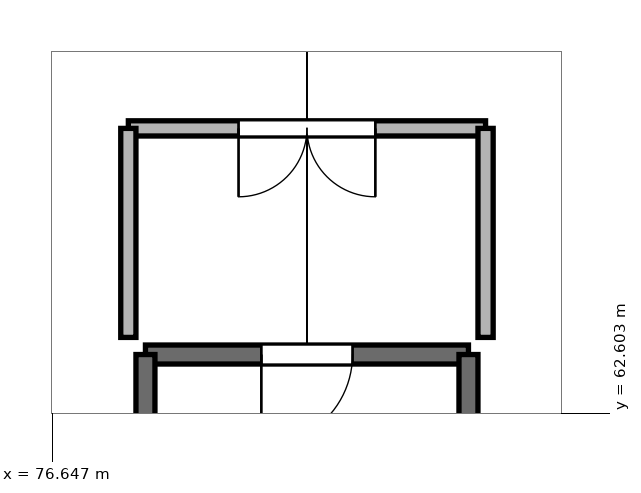
"""IFC4 building model, lengths in metres.
Left out: names, types, materials, properties, quantities, classifications, styles, units other than length and angle.
Written with IfcOpenShell. Run it as: python <this file> out.ifc"""

import sys

from ifc_helpers import new_model, si_unit, direction, frame, frame_2d, origin, place, context, subcontext, project, spatial, rectangle, extrude, element, fill, save


model = new_model("IFC4")
c1 = context("Model", 3, precision=1e-05, world=origin(), true_north=direction((0.0, 1.0)))
c2 = subcontext(c1, "Body", "Model", "MODEL_VIEW")
j1 = project(units=[si_unit("LENGTHUNIT", "METRE"), si_unit("PLANEANGLEUNIT", "RADIAN")], contexts=[c1])
p1 = place(None, origin())
s1 = spatial("IfcSite", under=j1, at=p1, CompositionType="ELEMENT")
p2 = place(p1, origin())
s2 = spatial("IfcBuilding", under=s1, at=p2, CompositionType="ELEMENT")
p3 = place(p2, frame((0.0, 0.0, 30.8)))
s3 = spatial("IfcBuildingStorey", under=s2, at=p3, CompositionType="ELEMENT", Elevation=30.8)
p4 = place(p3, frame((82.125, 63.375, 0.0), z_axis=(0.0, 0.0, 1.0), x_axis=(-1.0, 0.0, 0.0)))
e1 = element("IfcWall", 1, at=p4, inside=s3, PredefinedType="SHEAR", context=c2, shape_type="SweptSolid", body=[
    extrude(rectangle(XDim=4.25, YDim=0.25, at=frame_2d((2.125, 0.0))), origin(), (0.0, 0.0, 1.0), 3.0),
])
p5 = place(p4, frame((1.525, 0.0, 0.0)))
e2 = element("IfcOpeningElement", 2, at=p5, cuts=e1, PredefinedType="OPENING", context=c2, shape_type="SweptSolid", body=[
    extrude(rectangle(XDim=1.2, YDim=2.2, at=frame_2d((0.6, 1.1))), frame((0.0, 0.137, 0.0), z_axis=(0.0, -1.0, 0.0), x_axis=(1.0, 0.0, 0.0)), (0.0, 0.0, 1.0), 0.274),
])
for number, where, z_axis, x_axis in (
    (3, (77.875, 63.375, 0.0), (0.0, 0.0, 1.0), (0.0, -1.0, 0.0)),
    (4, (82.125, 56.175, 0.0), (0.0, 0.0, 1.0), (0.0, 1.0, 0.0)),
):
    element("IfcWall", number, at=place(p3, frame(where, z_axis=z_axis, x_axis=x_axis)), inside=s3, PredefinedType="SHEAR", context=c2, shape_type="SweptSolid", body=[
        extrude(rectangle(XDim=7.2, YDim=0.25, at=frame_2d((3.6, 0.0))), origin(), (0.0, 0.0, 1.0), 3.0),
    ])
p6 = place(p3, frame((77.65, 66.35, 0.0), z_axis=(0.0, 0.0, 1.0), x_axis=(1.0, 0.0, 0.0)))
e5 = element("IfcWall", 5, at=p6, inside=s3, PredefinedType="PARTITIONING", context=c2, shape_type="SweptSolid", body=[
    extrude(rectangle(XDim=4.7, YDim=0.2, at=frame_2d((2.35, 0.0))), origin(), (0.0, 0.0, 1.0), 2.53),
])
p7 = place(p6, frame((1.45, 0.0, 0.0)))
e6 = element("IfcOpeningElement", 6, at=p7, cuts=e5, PredefinedType="OPENING", context=c2, shape_type="SweptSolid", body=[
    extrude(rectangle(XDim=1.8, YDim=2.2, at=frame_2d((0.9, 1.1))), frame((0.0, 0.112, 0.0), z_axis=(0.0, -1.0, 0.0), x_axis=(1.0, 0.0, 0.0)), (0.0, 0.0, 1.0), 0.224),
])
for number, where, z_axis, x_axis in (
    (7, (77.65, 63.6, 0.0), (0.0, 0.0, 1.0), (0.0, 1.0, 0.0)),
    (8, (82.35, 63.6, 0.0), (0.0, 0.0, 1.0), (0.0, 1.0, 0.0)),
):
    element("IfcWall", number, at=place(p3, frame(where, z_axis=z_axis, x_axis=x_axis)), inside=s3, PredefinedType="PARTITIONING", context=c2, shape_type="SweptSolid", body=[
        extrude(rectangle(XDim=2.75, YDim=0.2, at=frame_2d((1.375, 0.0))), origin(), (0.0, 0.0, 1.0), 2.53),
    ])
p8 = place(p5, origin())
e9 = element("IfcDoor", 9, at=p8, inside=s3, OperationType="SINGLE_SWING_RIGHT", PredefinedType="DOOR", context=c2, shape_type="SweptSolid", body=[
    extrude(rectangle(XDim=1.2, YDim=2.2, at=frame_2d((0.6, 1.1))), frame((0.0, 0.025, 0.0), z_axis=(0.0, -1.0, 0.0), x_axis=(1.0, 0.0, 0.0)), (0.0, 0.0, 1.0), 0.05),
])
fill(e2, e9)
p9 = place(p7, frame((1.8, 0.0, 0.0), z_axis=(0.0, 0.0, 1.0), x_axis=(-1.0, 0.0, 0.0)))
e10 = element("IfcDoor", 10, at=p9, inside=s3, OperationType="DOUBLE_DOOR_SINGLE_SWING", PredefinedType="DOOR", context=c2, shape_type="SweptSolid", body=[
    extrude(rectangle(XDim=1.8, YDim=2.2, at=frame_2d((0.9, 1.1))), frame((0.0, 0.025, 0.0), z_axis=(0.0, -1.0, 0.0), x_axis=(1.0, 0.0, 0.0)), (0.0, 0.0, 1.0), 0.05),
])
fill(e6, e10)
save(model, sys.argv[1])
